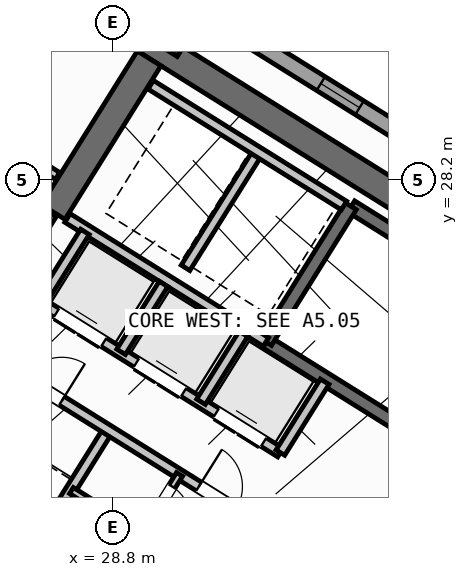
"""IFC4 building model, lengths in metres.
Left out: names, types, materials, properties, quantities, classifications, styles, units other than length and angle.
Written with IfcOpenShell. Run it as: python <this file> out.ifc"""

import sys

from ifc_helpers import new_model, si_unit, direction, frame, frame_2d, origin, origin_2d, place, context, subcontext, project, spatial, rectangle, hollow_rectangle, extrude, source, transform, mapped, element, fill, save


model = new_model("IFC4")
c1 = context("Model", 3, precision=1e-05, world=origin(), true_north=direction((0.0, 1.0)))
c2 = subcontext(c1, "Body", "Model", "MODEL_VIEW")
j1 = project(units=[si_unit("LENGTHUNIT", "METRE"), si_unit("PLANEANGLEUNIT", "RADIAN")], contexts=[c1])
p1 = place(None, origin())
s1 = spatial("IfcSite", under=j1, at=p1, CompositionType="ELEMENT")
p2 = place(p1, origin())
s2 = spatial("IfcBuilding", under=s1, at=p2, CompositionType="ELEMENT")
p3 = place(p2, frame((0.0, 0.0, 132.6)))
s3 = spatial("IfcBuildingStorey", under=s2, at=p3, CompositionType="ELEMENT", Elevation=132.6)
p4 = place(p3, frame((40.573, 24.01, 0.0), z_axis=(0.0, 0.0, 1.0), x_axis=(-0.848047359947, 0.529920442413, 0.0)))
e1 = element("IfcWall", 1, at=p4, inside=s3, PredefinedType="SHEAR", context=c2, shape_type="SweptSolid", body=[
    extrude(rectangle(XDim=13.14, YDim=0.55, at=frame_2d((6.57, 0.0))), origin(), (0.0, 0.0, 1.0), 3.32),
])
p5 = place(p3, frame((29.517, 30.594, 0.0), z_axis=(0.0, 0.0, 1.0), x_axis=(-0.529906864564, -0.848055844204, 0.0)))
e2 = element("IfcWall", 2, at=p5, inside=s3, PredefinedType="SHEAR", context=c2, shape_type="SweptSolid", body=[
    extrude(rectangle(XDim=3.575, YDim=0.55, at=frame_2d((1.788, 0.0))), origin(), (0.0, 0.0, 1.0), 3.32),
])
m1 = source(origin(), c2, "Body", "SweptSolid", [
    extrude(hollow_rectangle(XDim=0.9, YDim=0.9, WallThickness=0.036, at=origin_2d()), origin(), (0.0, 0.0, 1.0), 3.6),
])
p6 = place(p3, frame((29.928, 31.251, 0.0), z_axis=(0.0, 0.0, 1.0), x_axis=(-0.848048096156, 0.529919264233, 0.0)))
e3 = element("IfcColumn", 3, at=p6, inside=s3, PredefinedType="COLUMN", context=c2, shape_type="MappedRepresentation", body=[
    mapped(m1, transform((0.0, 0.0, 0.0), scale=1.0)),
])
p7 = place(p3, frame((29.268, 6.429, 0.0), z_axis=(0.0, 0.0, 1.0), x_axis=(-0.848049971435, 0.529916263149, 0.0)))
e4 = element("IfcWall", 4, at=p7, inside=s3, PredefinedType="STANDARD", context=c2, shape_type="SweptSolid", body=[
    extrude(rectangle(XDim=31.588, YDim=0.32, at=frame_2d((15.794, 0.0))), origin(), (0.0, 0.0, 1.0), 3.32),
])
p8 = place(p7, frame((16.362, 0.0, 0.0)))
e5 = element("IfcOpeningElement", 5, at=p8, cuts=e4, PredefinedType="OPENING", context=c2, shape_type="SweptSolid", body=[
    extrude(rectangle(XDim=1.2, YDim=2.15, at=frame_2d((0.6, 1.075))), frame((0.0, 0.17, 0.0), z_axis=(0.0, -1.0, 0.0), x_axis=(1.0, 0.0, 0.0)), (0.0, 0.0, 1.0), 0.34),
])
p9 = place(p7, frame((2.989, 0.0, 0.8)))
e6 = element("IfcOpeningElement", 6, at=p9, cuts=e4, PredefinedType="OPENING", context=c2, shape_type="SweptSolid", body=[
    extrude(rectangle(XDim=2.1, YDim=1.55, at=frame_2d((1.05, 0.775))), frame((0.0, 0.17, 0.0), z_axis=(0.0, -1.0, 0.0), x_axis=(1.0, 0.0, 0.0)), (0.0, 0.0, 1.0), 0.34),
])
p10 = place(p7, frame((8.359, 0.0, 0.8)))
e7 = element("IfcOpeningElement", 7, at=p10, cuts=e4, PredefinedType="OPENING", context=c2, shape_type="SweptSolid", body=[
    extrude(rectangle(XDim=2.1, YDim=1.55, at=frame_2d((1.05, 0.775))), frame((0.0, 0.17, 0.0), z_axis=(0.0, -1.0, 0.0), x_axis=(1.0, 0.0, 0.0)), (0.0, 0.0, 1.0), 0.34),
])
p11 = place(p7, frame((13.284, 0.0, 0.95)))
e8 = element("IfcOpeningElement", 8, at=p11, cuts=e4, PredefinedType="OPENING", context=c2, shape_type="SweptSolid", body=[
    extrude(rectangle(XDim=1.2, YDim=1.4, at=frame_2d((0.6, 0.7))), frame((0.0, 0.17, 0.0), z_axis=(0.0, -1.0, 0.0), x_axis=(1.0, 0.0, 0.0)), (0.0, 0.0, 1.0), 0.34),
])
p12 = place(p7, frame((20.39, 0.0, 0.95)))
e9 = element("IfcOpeningElement", 9, at=p12, cuts=e4, PredefinedType="OPENING", context=c2, shape_type="SweptSolid", body=[
    extrude(rectangle(XDim=1.2, YDim=1.4, at=frame_2d((0.6, 0.7))), frame((0.0, 0.17, 0.0), z_axis=(0.0, -1.0, 0.0), x_axis=(1.0, 0.0, 0.0)), (0.0, 0.0, 1.0), 0.34),
])
p13 = place(p7, frame((23.715, 0.0, 1.0)))
e10 = element("IfcOpeningElement", 10, at=p13, cuts=e4, PredefinedType="OPENING", context=c2, shape_type="SweptSolid", body=[
    extrude(rectangle(XDim=0.9, YDim=1.25, at=frame_2d((0.45, 0.625))), frame((0.0, 0.17, 0.0), z_axis=(0.0, -1.0, 0.0), x_axis=(1.0, 0.0, 0.0)), (0.0, 0.0, 1.0), 0.34),
])
p14 = place(p7, frame((27.481, 0.0, 0.8)))
e11 = element("IfcOpeningElement", 11, at=p14, cuts=e4, PredefinedType="OPENING", context=c2, shape_type="SweptSolid", body=[
    extrude(rectangle(XDim=2.1, YDim=1.55, at=frame_2d((1.05, 0.775))), frame((0.0, 0.17, 0.0), z_axis=(0.0, -1.0, 0.0), x_axis=(1.0, 0.0, 0.0)), (0.0, 0.0, 1.0), 0.34),
])
p15 = place(p3, frame((14.138, 41.825, 0.0), z_axis=(0.0, 0.0, 1.0), x_axis=(0.848046498049, -0.529921821731, 0.0)))
e12 = element("IfcWall", 12, at=p15, inside=s3, PredefinedType="STANDARD", context=c2, shape_type="SweptSolid", body=[
    extrude(rectangle(XDim=31.588, YDim=0.32, at=frame_2d((15.794, 0.0))), origin(), (0.0, 0.0, 1.0), 3.32),
])
p16 = place(p15, frame((3.253, 0.0, 0.0)))
e13 = element("IfcOpeningElement", 13, at=p16, cuts=e12, PredefinedType="OPENING", context=c2, shape_type="SweptSolid", body=[
    extrude(rectangle(XDim=1.05, YDim=2.15, at=frame_2d((0.525, 1.075))), frame((0.0, 0.17, 0.0), z_axis=(0.0, -1.0, 0.0), x_axis=(1.0, 0.0, 0.0)), (0.0, 0.0, 1.0), 0.34),
])
p17 = place(p15, frame((0.863, 0.0, 0.85)))
e14 = element("IfcOpeningElement", 14, at=p17, cuts=e12, PredefinedType="OPENING", context=c2, shape_type="SweptSolid", body=[
    extrude(rectangle(XDim=1.8, YDim=1.5, at=frame_2d((0.9, 0.75))), frame((0.0, 0.17, 0.0), z_axis=(0.0, -1.0, 0.0), x_axis=(1.0, 0.0, 0.0)), (0.0, 0.0, 1.0), 0.34),
])
p18 = place(p15, frame((8.435, 0.0, 0.85)))
e15 = element("IfcOpeningElement", 15, at=p18, cuts=e12, PredefinedType="OPENING", context=c2, shape_type="SweptSolid", body=[
    extrude(rectangle(XDim=1.8, YDim=1.5, at=frame_2d((0.9, 0.75))), frame((0.0, 0.17, 0.0), z_axis=(0.0, -1.0, 0.0), x_axis=(1.0, 0.0, 0.0)), (0.0, 0.0, 1.0), 0.34),
])
p19 = place(p15, frame((13.874, 0.0, 0.85)))
e16 = element("IfcOpeningElement", 16, at=p19, cuts=e12, PredefinedType="OPENING", context=c2, shape_type="SweptSolid", body=[
    extrude(rectangle(XDim=1.5, YDim=1.5, at=frame_2d((0.75, 0.75))), frame((0.0, 0.17, 0.0), z_axis=(0.0, -1.0, 0.0), x_axis=(1.0, 0.0, 0.0)), (0.0, 0.0, 1.0), 0.34),
])
p20 = place(p15, frame((17.104, 0.0, 1.0)))
e17 = element("IfcOpeningElement", 17, at=p20, cuts=e12, PredefinedType="OPENING", context=c2, shape_type="SweptSolid", body=[
    extrude(rectangle(XDim=0.9, YDim=1.25, at=frame_2d((0.45, 0.625))), frame((0.0, 0.17, 0.0), z_axis=(0.0, -1.0, 0.0), x_axis=(1.0, 0.0, 0.0)), (0.0, 0.0, 1.0), 0.34),
])
p21 = place(p15, frame((22.131, 0.0, 1.0)))
e18 = element("IfcOpeningElement", 18, at=p21, cuts=e12, PredefinedType="OPENING", context=c2, shape_type="SweptSolid", body=[
    extrude(rectangle(XDim=0.9, YDim=1.25, at=frame_2d((0.45, 0.625))), frame((0.0, 0.17, 0.0), z_axis=(0.0, -1.0, 0.0), x_axis=(1.0, 0.0, 0.0)), (0.0, 0.0, 1.0), 0.34),
])
p22 = place(p15, frame((27.706, 0.0, 1.0)))
e19 = element("IfcOpeningElement", 19, at=p22, cuts=e12, PredefinedType="OPENING", context=c2, shape_type="SweptSolid", body=[
    extrude(rectangle(XDim=0.9, YDim=1.25, at=frame_2d((0.45, 0.625))), frame((0.0, 0.17, 0.0), z_axis=(0.0, -1.0, 0.0), x_axis=(1.0, 0.0, 0.0)), (0.0, 0.0, 1.0), 0.34),
])
p23 = place(p3, frame((31.28, 18.261, 0.0), z_axis=(0.0, 0.0, 1.0), x_axis=(-0.848051618787, 0.529913626805, 0.0)))
e20 = element("IfcWall", 20, at=p23, inside=s3, PredefinedType="SHEAR", context=c2, shape_type="SweptSolid", body=[
    extrude(rectangle(XDim=7.46, YDim=0.26, at=frame_2d((3.73, 0.0))), origin(), (0.0, 0.0, 1.0), 3.32),
])
p24 = place(p23, frame((0.36, 0.0, 0.0)))
e21 = element("IfcOpeningElement", 21, at=p24, cuts=e20, PredefinedType="OPENING", context=c2, shape_type="SweptSolid", body=[
    extrude(rectangle(XDim=0.86, YDim=2.05, at=frame_2d((0.43, 1.025))), frame((0.0, 0.14, 0.0), z_axis=(0.0, -1.0, 0.0), x_axis=(1.0, 0.0, 0.0)), (0.0, 0.0, 1.0), 0.28),
])
p25 = place(p3, frame((39.721, 23.788, 0.0), z_axis=(0.0, 0.0, 1.0), x_axis=(-0.848054434086, 0.529909121291, 0.0)))
e22 = element("IfcWall", 22, at=p25, inside=s3, PredefinedType="SHEAR", context=c2, shape_type="SweptSolid", body=[
    extrude(rectangle(XDim=7.33, YDim=0.26, at=frame_2d((3.665, 0.0))), origin(), (0.0, 0.0, 1.0), 3.32),
])
p26 = place(p3, frame((38.046, 21.108, 0.0), z_axis=(0.0, 0.0, 1.0), x_axis=(-0.848054434086, 0.529909121291, 0.0)))
e23 = element("IfcWall", 23, at=p26, inside=s3, PredefinedType="SHEAR", context=c2, shape_type="SweptSolid", body=[
    extrude(rectangle(XDim=7.33, YDim=0.26, at=frame_2d((3.665, 0.0))), origin(), (0.0, 0.0, 1.0), 3.32),
])
p27 = place(p26, frame((0.22, 0.0, 0.0)))
e24 = element("IfcOpeningElement", 24, at=p27, cuts=e23, PredefinedType="OPENING", context=c2, shape_type="SweptSolid", body=[
    extrude(rectangle(XDim=1.1, YDim=2.1, at=frame_2d((0.55, 1.05))), frame((0.0, 0.14, 0.0), z_axis=(0.0, -1.0, 0.0), x_axis=(1.0, 0.0, 0.0)), (0.0, 0.0, 1.0), 0.28),
])
p28 = place(p3, frame((33.496, 27.677, 0.0), z_axis=(0.0, 0.0, 1.0), x_axis=(-0.529908658664, -0.84805472316, 0.0)))
e25 = element("IfcWall", 25, at=p28, inside=s3, PredefinedType="SHEAR", context=c2, shape_type="SweptSolid", body=[
    extrude(rectangle(XDim=3.16, YDim=0.26, at=frame_2d((1.58, 0.0))), origin(), (0.0, 0.0, 1.0), 3.32),
])
p29 = place(p3, frame((31.822, 24.998, 0.0), z_axis=(0.0, 0.0, 1.0), x_axis=(-0.848036912365, 0.52993716162, 0.0)))
e26 = element("IfcWall", 26, at=p29, inside=s3, PredefinedType="STANDARD", context=c2, shape_type="SweptSolid", body=[
    extrude(rectangle(XDim=4.618, YDim=0.2, at=frame_2d((2.309, 0.0))), origin(), (0.0, 0.0, 1.0), 3.31),
])
p30 = place(p3, frame((32.108, 22.814, 0.0), z_axis=(0.0, 0.0, 1.0), x_axis=(-0.848042229521, 0.529928652696, 0.0)))
e27 = element("IfcWall", 27, at=p30, inside=s3, PredefinedType="STANDARD", context=c2, shape_type="SweptSolid", body=[
    extrude(rectangle(XDim=5.62, YDim=0.2, at=frame_2d((2.81, 0.0))), origin(), (0.0, 0.0, 1.0), 3.31),
])
p31 = place(p30, frame((0.39, 0.0, 0.0)))
e28 = element("IfcOpeningElement", 28, at=p31, cuts=e27, PredefinedType="OPENING", context=c2, shape_type="SweptSolid", body=[
    extrude(rectangle(XDim=1.1, YDim=2.15, at=frame_2d((0.55, 1.075))), frame((0.0, 0.11, 0.0), z_axis=(0.0, -1.0, 0.0), x_axis=(1.0, 0.0, 0.0)), (0.0, 0.0, 1.0), 0.22),
])
p32 = place(p30, frame((2.25, 0.0, 0.0)))
e29 = element("IfcOpeningElement", 29, at=p32, cuts=e27, PredefinedType="OPENING", context=c2, shape_type="SweptSolid", body=[
    extrude(rectangle(XDim=1.1, YDim=2.15, at=frame_2d((0.55, 1.075))), frame((0.0, 0.11, 0.0), z_axis=(0.0, -1.0, 0.0), x_axis=(1.0, 0.0, 0.0)), (0.0, 0.0, 1.0), 0.22),
])
p33 = place(p30, frame((4.11, 0.0, 0.0)))
e30 = element("IfcOpeningElement", 30, at=p33, cuts=e27, PredefinedType="OPENING", context=c2, shape_type="SweptSolid", body=[
    extrude(rectangle(XDim=1.1, YDim=2.15, at=frame_2d((0.55, 1.075))), frame((0.0, 0.11, 0.0), z_axis=(0.0, -1.0, 0.0), x_axis=(1.0, 0.0, 0.0)), (0.0, 0.0, 1.0), 0.22),
])
p34 = place(p3, frame((32.982, 24.213, 0.0), z_axis=(0.0, 0.0, 1.0), x_axis=(-0.529839334948, -0.84809803628, 0.0)))
e31 = element("IfcWall", 31, at=p34, inside=s3, PredefinedType="STANDARD", context=c2, shape_type="SweptSolid", body=[
    extrude(rectangle(XDim=1.65, YDim=0.2, at=frame_2d((0.825, 0.0))), origin(), (0.0, 0.0, 1.0), 3.31),
])
p35 = place(p3, frame((28.25, 27.17, 0.0), z_axis=(0.0, 0.0, 1.0), x_axis=(-0.529905827651, -0.848056492117, 0.0)))
e32 = element("IfcWall", 32, at=p35, inside=s3, PredefinedType="STANDARD", context=c2, shape_type="SweptSolid", body=[
    extrude(rectangle(XDim=1.65, YDim=0.2, at=frame_2d((0.825, 0.0))), origin(), (0.0, 0.0, 1.0), 3.31),
])
p36 = place(p3, frame((31.645, 28.716, 0.0), z_axis=(0.0, 0.0, 1.0), x_axis=(-0.52986693015, -0.848080795876, 0.0)))
e33 = element("IfcWall", 33, at=p36, inside=s3, PredefinedType="STANDARD", context=c2, shape_type="SweptSolid", body=[
    extrude(rectangle(XDim=2.66, YDim=0.2, at=frame_2d((1.33, 0.0))), origin(), (0.0, 0.0, 1.0), 3.31),
])
p37 = place(p3, frame((33.363, 27.69, 0.0), z_axis=(0.0, 0.0, 1.0), x_axis=(-0.848047090064, 0.529920874315, 0.0)))
e34 = element("IfcWall", 34, at=p37, inside=s3, PredefinedType="STANDARD", context=c2, shape_type="SweptSolid", body=[
    extrude(rectangle(XDim=4.498, YDim=0.2, at=frame_2d((2.249, 0.0))), origin(), (0.0, 0.0, 1.0), 3.31),
])
for number, where, z_axis, x_axis in (
    (35, (31.379, 25.156, 0.0), (0.0, 0.0, 1.0), (-0.53, -0.848, 0.0)),
    (36, (29.801, 26.142, 0.0), (0.0, 0.0, 1.0), (-0.53, -0.848, 0.0)),
):
    element("IfcWall", number, at=place(p3, frame(where, z_axis=z_axis, x_axis=x_axis)), inside=s3, PredefinedType="STANDARD", context=c2, shape_type="SweptSolid", body=[
        extrude(rectangle(XDim=1.58, YDim=0.2, at=frame_2d((0.79, 0.0))), origin(), (0.0, 0.0, 1.0), 3.31),
    ])
p38 = place(p3, frame((28.71, 23.263, 0.0), z_axis=(0.0, 0.0, 1.0), x_axis=(-0.529907497854, -0.848055448493, 0.0)))
e37 = element("IfcWall", 37, at=p38, inside=s3, PredefinedType="STANDARD", context=c2, shape_type="SweptSolid", body=[
    extrude(rectangle(XDim=2.88, YDim=0.2, at=frame_2d((1.44, 0.0))), origin(), (0.0, 0.0, 1.0), 3.31),
])
p39 = place(p3, frame((31.525, 21.504, 0.0), z_axis=(0.0, 0.0, 1.0), x_axis=(-0.848040211232, 0.529931882541, 0.0)))
e38 = element("IfcWall", 38, at=p39, inside=s3, PredefinedType="STANDARD", context=c2, shape_type="SweptSolid", body=[
    extrude(rectangle(XDim=6.218, YDim=0.2, at=frame_2d((3.109, 0.0))), origin(), (0.0, 0.0, 1.0), 3.31),
])
p40 = place(p39, frame((4.4, 0.0, 0.0)))
e39 = element("IfcOpeningElement", 39, at=p40, cuts=e38, PredefinedType="OPENING", context=c2, shape_type="SweptSolid", body=[
    extrude(rectangle(XDim=0.86, YDim=2.05, at=frame_2d((0.43, 1.025))), frame((0.0, 0.11, 0.0), z_axis=(0.0, -1.0, 0.0), x_axis=(1.0, 0.0, 0.0)), (0.0, 0.0, 1.0), 0.22),
])
p41 = place(p39, frame((0.35, 0.0, 0.0)))
e40 = element("IfcOpeningElement", 40, at=p41, cuts=e38, PredefinedType="OPENING", context=c2, shape_type="SweptSolid", body=[
    extrude(rectangle(XDim=0.86, YDim=2.05, at=frame_2d((0.43, 1.025))), frame((0.0, 0.11, 0.0), z_axis=(0.0, -1.0, 0.0), x_axis=(1.0, 0.0, 0.0)), (0.0, 0.0, 1.0), 0.22),
])
p42 = place(p3, frame((30.117, 22.384, 0.0), z_axis=(0.0, 0.0, 1.0), x_axis=(-0.529951914384, -0.848027693204, 0.0)))
e41 = element("IfcWall", 41, at=p42, inside=s3, PredefinedType="PLUMBINGWALL", context=c2, shape_type="SweptSolid", body=[
    extrude(rectangle(XDim=1.4, YDim=0.14, at=frame_2d((0.7, 0.0))), origin(), (0.0, 0.0, 1.0), 3.31),
])
p43 = place(p42, frame((0.28, 0.0, 0.0)))
e42 = element("IfcOpeningElement", 42, at=p43, cuts=e41, PredefinedType="OPENING", context=c2, shape_type="SweptSolid", body=[
    extrude(rectangle(XDim=0.78, YDim=2.05, at=frame_2d((0.39, 1.025))), frame((0.0, 0.08, 0.0), z_axis=(0.0, -1.0, 0.0), x_axis=(1.0, 0.0, 0.0)), (0.0, 0.0, 1.0), 0.16),
])
p44 = place(p3, frame((30.766, 20.327, 0.0), z_axis=(0.0, 0.0, 1.0), x_axis=(-0.848052663127, 0.529911955482, 0.0)))
e43 = element("IfcWall", 43, at=p44, inside=s3, PredefinedType="PLUMBINGWALL", context=c2, shape_type="SweptSolid", body=[
    extrude(rectangle(XDim=3.28, YDim=0.14, at=frame_2d((1.64, 0.0))), origin(), (0.0, 0.0, 1.0), 3.31),
])
p45 = place(p44, frame((0.25, 0.0, 0.0)))
e44 = element("IfcOpeningElement", 44, at=p45, cuts=e43, PredefinedType="OPENING", context=c2, shape_type="SweptSolid", body=[
    extrude(rectangle(XDim=0.78, YDim=2.05, at=frame_2d((0.39, 1.025))), frame((0.0, 0.08, 0.0), z_axis=(0.0, -1.0, 0.0), x_axis=(1.0, 0.0, 0.0)), (0.0, 0.0, 1.0), 0.16),
])
p46 = place(p44, frame((1.92, 0.0, 0.0)))
e45 = element("IfcOpeningElement", 45, at=p46, cuts=e43, PredefinedType="OPENING", context=c2, shape_type="SweptSolid", body=[
    extrude(rectangle(XDim=0.78, YDim=2.05, at=frame_2d((0.39, 1.025))), frame((0.0, 0.08, 0.0), z_axis=(0.0, -1.0, 0.0), x_axis=(1.0, 0.0, 0.0)), (0.0, 0.0, 1.0), 0.16),
])
p47 = place(p3, frame((27.596, 27.52, 0.0), z_axis=(0.0, 0.0, 1.0), x_axis=(-0.529865479138, -0.848081702443, 0.0)))
e46 = element("IfcWall", 46, at=p47, inside=s3, PredefinedType="STANDARD", context=c2, shape_type="SweptSolid", body=[
    extrude(rectangle(XDim=2.96, YDim=0.2, at=frame_2d((1.48, 0.0))), origin(), (0.0, 0.0, 1.0), 3.31),
])
p48 = place(p47, frame((1.76, 0.0, 0.0)))
e47 = element("IfcOpeningElement", 47, at=p48, cuts=e46, PredefinedType="OPENING", context=c2, shape_type="SweptSolid", body=[
    extrude(rectangle(XDim=0.86, YDim=2.05, at=frame_2d((0.43, 1.025))), frame((0.0, 0.11, 0.0), z_axis=(0.0, -1.0, 0.0), x_axis=(1.0, 0.0, 0.0)), (0.0, 0.0, 1.0), 0.22),
])
p49 = place(p3, frame((27.711, 28.274, 0.0), z_axis=(0.0, 0.0, 1.0), x_axis=(-0.848075553449, 0.529875320846, 0.0)))
e48 = element("IfcWall", 48, at=p49, inside=s3, PredefinedType="PARTITIONING", context=c2, shape_type="SweptSolid", body=[
    extrude(rectangle(XDim=2.308, YDim=0.16, at=frame_2d((1.154, 0.0))), origin(), (0.0, 0.0, 1.0), 3.31),
])
p50 = place(p49, frame((0.648, 0.0, 0.0)))
e49 = element("IfcOpeningElement", 49, at=p50, cuts=e48, PredefinedType="OPENING", context=c2, shape_type="SweptSolid", body=[
    extrude(rectangle(XDim=0.86, YDim=2.05, at=frame_2d((0.43, 1.025))), frame((0.0, 0.09, 0.0), z_axis=(0.0, -1.0, 0.0), x_axis=(1.0, 0.0, 0.0)), (0.0, 0.0, 1.0), 0.18),
])
p51 = place(p3, frame((27.953, 33.016, 0.0), z_axis=(0.0, 0.0, 1.0), x_axis=(-0.529872022255, -0.848077614391, 0.0)))
e50 = element("IfcWall", 50, at=p51, inside=s3, PredefinedType="PARTITIONING", context=c2, shape_type="SweptSolid", body=[
    extrude(rectangle(XDim=4.15, YDim=0.16, at=frame_2d((2.075, 0.0))), origin(), (0.0, 0.0, 1.0), 3.31),
])
m2 = source(origin(), c2, "Body", "SweptSolid", [
    extrude(rectangle(XDim=0.9, YDim=1.25, at=frame_2d((0.45, 0.625))), frame((0.0, 0.03, 0.0), z_axis=(0.0, -1.0, 0.0), x_axis=(1.0, 0.0, 0.0)), (0.0, 0.0, 1.0), 0.06),
])
p52 = place(p21, origin())
e51 = element("IfcWindow", 51, at=p52, inside=s3, PartitioningType="SINGLE_PANEL", PredefinedType="WINDOW", context=c2, shape_type="MappedRepresentation", body=[
    mapped(m2, transform((0.0, 0.0, 0.0), scale=1.0)),
])
fill(e18, e51)
m3 = source(origin(), c2, "Body", "SweptSolid", [
    extrude(rectangle(XDim=1.1, YDim=2.15, at=frame_2d((0.55, 1.075))), frame((0.0, 0.025, 0.0), z_axis=(0.0, -1.0, 0.0), x_axis=(1.0, 0.0, 0.0)), (0.0, 0.0, 1.0), 0.05),
])
p53 = place(p31, origin())
e52 = element("IfcDoor", 52, at=p53, inside=s3, OperationType="DOUBLE_DOOR_SLIDING", PredefinedType="DOOR", context=c2, shape_type="MappedRepresentation", body=[
    mapped(m3, transform((0.0, 0.0, 0.0), scale=1.0)),
])
fill(e28, e52)
p54 = place(p32, origin())
e53 = element("IfcDoor", 53, at=p54, inside=s3, OperationType="DOUBLE_DOOR_SLIDING", PredefinedType="DOOR", context=c2, shape_type="MappedRepresentation", body=[
    mapped(m3, transform((0.0, 0.0, 0.0), scale=1.0)),
])
fill(e29, e53)
p55 = place(p33, origin())
e54 = element("IfcDoor", 54, at=p55, inside=s3, OperationType="DOUBLE_DOOR_SLIDING", PredefinedType="DOOR", context=c2, shape_type="MappedRepresentation", body=[
    mapped(m3, transform((0.0, 0.0, 0.0), scale=1.0)),
])
fill(e30, e54)
m4 = source(origin(), c2, "Body", "SweptSolid", [
    extrude(rectangle(XDim=0.86, YDim=2.05, at=frame_2d((0.43, 1.025))), frame((0.0, 0.025, 0.0), z_axis=(0.0, -1.0, 0.0), x_axis=(1.0, 0.0, 0.0)), (0.0, 0.0, 1.0), 0.05),
])
p56 = place(p40, frame((0.86, 0.0, 0.0), z_axis=(0.0, 0.0, 1.0), x_axis=(-1.0, 0.0, 0.0)))
e55 = element("IfcDoor", 55, at=p56, inside=s3, OperationType="SINGLE_SWING_RIGHT", PredefinedType="DOOR", context=c2, shape_type="MappedRepresentation", body=[
    mapped(m4, transform((0.0, 0.0, 0.0), scale=1.0)),
])
fill(e39, e55)
p57 = place(p41, frame((0.86, 0.0, 0.0), z_axis=(0.0, 0.0, 1.0), x_axis=(-1.0, 0.0, 0.0)))
e56 = element("IfcDoor", 56, at=p57, inside=s3, OperationType="SINGLE_SWING_LEFT", PredefinedType="DOOR", context=c2, shape_type="MappedRepresentation", body=[
    mapped(m4, transform((0.0, 0.0, 0.0), scale=1.0)),
])
fill(e40, e56)
m5 = source(origin(), c2, "Body", "SweptSolid", [
    extrude(rectangle(XDim=0.78, YDim=2.05, at=frame_2d((0.39, 1.025))), frame((0.0, 0.025, 0.0), z_axis=(0.0, -1.0, 0.0), x_axis=(1.0, 0.0, 0.0)), (0.0, 0.0, 1.0), 0.05),
])
p58 = place(p43, origin())
e57 = element("IfcDoor", 57, at=p58, inside=s3, OperationType="SINGLE_SWING_RIGHT", PredefinedType="DOOR", context=c2, shape_type="MappedRepresentation", body=[
    mapped(m5, transform((0.0, 0.0, 0.0), scale=1.0)),
])
fill(e42, e57)
save(model, sys.argv[1])
